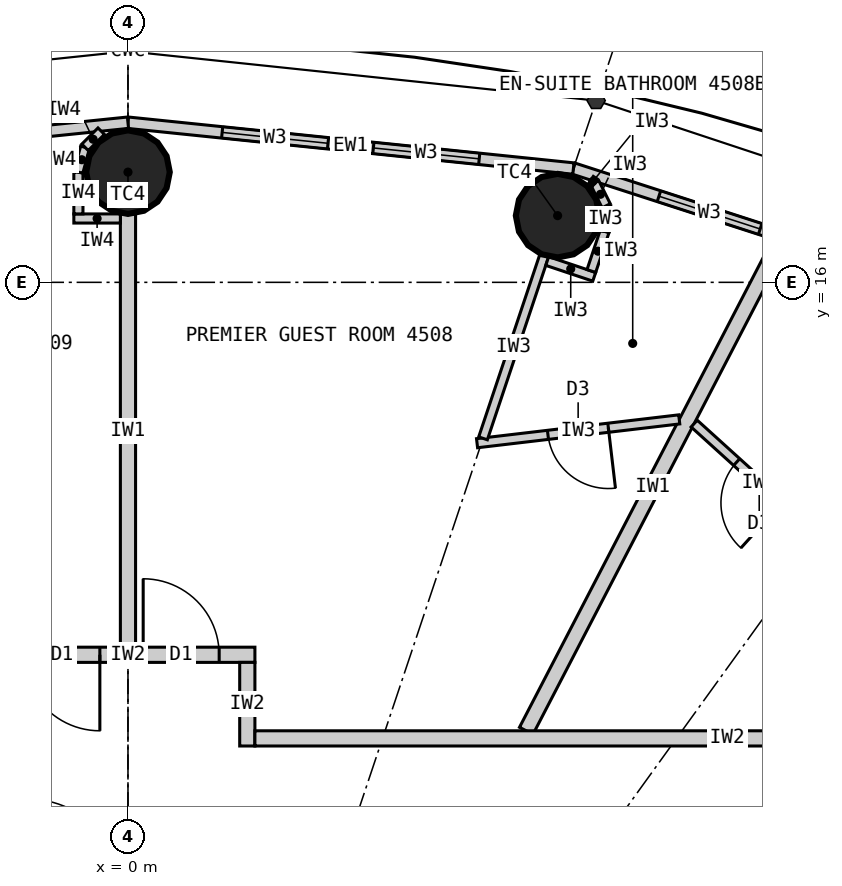
"""IFC4 building model, lengths in metres.
Left out: names, types, materials, properties, quantities, classifications, styles, units other than length and angle.
Written with IfcOpenShell. Run it as: python <this file> out.ifc"""

import sys

from ifc_helpers import new_model, si_unit, direction, frame, frame_2d, origin, origin_2d, place, context, subcontext, project, spatial, rectangle, circle, extrude, element, fill, save


model = new_model("IFC4")
c1 = context("Model", 3, precision=1e-05, world=origin(), true_north=direction((0.0, 1.0)))
c2 = subcontext(c1, "Body", "Model", "MODEL_VIEW")
j1 = project(units=[si_unit("LENGTHUNIT", "METRE"), si_unit("PLANEANGLEUNIT", "RADIAN")], contexts=[c1])
p1 = place(None, origin())
s1 = spatial("IfcSite", under=j1, at=p1, CompositionType="ELEMENT")
p2 = place(p1, origin())
s2 = spatial("IfcBuilding", under=s1, at=p2, CompositionType="ELEMENT")
p3 = place(p2, frame((0.0, 0.0, 169.8)))
s3 = spatial("IfcBuildingStorey", under=s2, at=p3, CompositionType="ELEMENT", Elevation=169.8)
for number, where, z_axis, x_axis in (
    (1, (5.653, 16.877, 0.0), (0.0, 0.0, 1.0), (1.0, 0.0, 0.0)),
    (2, (0.0, 17.45, 0.0), (0.0, 0.0, 1.0), (1.0, 0.0, 0.0)),
):
    element("IfcColumn", number, at=place(p3, frame(where, z_axis=z_axis, x_axis=x_axis)), inside=s3, PredefinedType="COLUMN", context=c2, shape_type="SweptSolid", body=[
        extrude(circle(Radius=0.55, at=origin_2d()), origin(), (0.0, 0.0, 1.0), 3.3),
    ])
p4 = place(p3, frame((11.346, 15.722, 0.0), z_axis=(0.0, 0.0, 1.0), x_axis=(-0.951432482129, 0.307857486429, 0.0)))
e3 = element("IfcWall", 3, at=p4, inside=s3, PredefinedType="ELEMENTEDWALL", context=c2, shape_type="SweptSolid", body=[
    extrude(rectangle(XDim=5.766, YDim=0.15, at=frame_2d((2.883, 0.0))), origin(), (0.0, 0.0, 1.0), 3.12),
])
p5 = place(p4, frame((1.183, 0.0, 0.9)))
e4 = element("IfcOpeningElement", 4, at=p5, cuts=e3, PredefinedType="OPENING", context=c2, shape_type="SweptSolid", body=[
    extrude(rectangle(XDim=1.4, YDim=1.9, at=frame_2d((0.7, 0.95))), frame((0.0, 0.085, 0.0), z_axis=(0.0, -1.0, 0.0), x_axis=(1.0, 0.0, 0.0)), (0.0, 0.0, 1.0), 0.17),
])
p6 = place(p4, frame((3.183, 0.0, 0.9)))
e5 = element("IfcOpeningElement", 5, at=p6, cuts=e3, PredefinedType="OPENING", context=c2, shape_type="SweptSolid", body=[
    extrude(rectangle(XDim=1.4, YDim=1.9, at=frame_2d((0.7, 0.95))), frame((0.0, 0.085, 0.0), z_axis=(0.0, -1.0, 0.0), x_axis=(1.0, 0.0, 0.0)), (0.0, 0.0, 1.0), 0.17),
])
p7 = place(p3, frame((5.86, 17.497, 0.0), z_axis=(0.0, 0.0, 1.0), x_axis=(-0.994751738032, 0.102318032045, 0.0)))
e6 = element("IfcWall", 6, at=p7, inside=s3, PredefinedType="ELEMENTEDWALL", context=c2, shape_type="SweptSolid", body=[
    extrude(rectangle(XDim=5.891, YDim=0.15, at=frame_2d((2.946, 0.0))), origin(), (0.0, 0.0, 1.0), 3.12),
])
p8 = place(p7, frame((1.246, 0.0, 0.9)))
e7 = element("IfcOpeningElement", 7, at=p8, cuts=e6, PredefinedType="OPENING", context=c2, shape_type="SweptSolid", body=[
    extrude(rectangle(XDim=1.4, YDim=1.9, at=frame_2d((0.7, 0.95))), frame((0.0, 0.085, 0.0), z_axis=(0.0, -1.0, 0.0), x_axis=(1.0, 0.0, 0.0)), (0.0, 0.0, 1.0), 0.17),
])
p9 = place(p7, frame((3.246, 0.0, 0.9)))
e8 = element("IfcOpeningElement", 8, at=p9, cuts=e6, PredefinedType="OPENING", context=c2, shape_type="SweptSolid", body=[
    extrude(rectangle(XDim=1.4, YDim=1.9, at=frame_2d((0.7, 0.95))), frame((0.0, 0.085, 0.0), z_axis=(0.0, -1.0, 0.0), x_axis=(1.0, 0.0, 0.0)), (0.0, 0.0, 1.0), 0.17),
])
p10 = place(p3, frame((0.0, 18.1, 0.0), z_axis=(0.0, 0.0, 1.0), x_axis=(-0.994751738032, -0.102318032045, 0.0)))
e9 = element("IfcWall", 9, at=p10, inside=s3, PredefinedType="ELEMENTEDWALL", context=c2, shape_type="SweptSolid", body=[
    extrude(rectangle(XDim=5.891, YDim=0.15, at=frame_2d((2.946, 0.0))), origin(), (0.0, 0.0, 1.0), 3.12),
])
p11 = place(p10, frame((1.246, 0.0, 0.9)))
e10 = element("IfcOpeningElement", 10, at=p11, cuts=e9, PredefinedType="OPENING", context=c2, shape_type="SweptSolid", body=[
    extrude(rectangle(XDim=1.4, YDim=1.9, at=frame_2d((0.7, 0.95))), frame((0.0, 0.085, 0.0), z_axis=(0.0, -1.0, 0.0), x_axis=(1.0, 0.0, 0.0)), (0.0, 0.0, 1.0), 0.17),
])
p12 = place(p10, frame((3.246, 0.0, 0.9)))
e11 = element("IfcOpeningElement", 11, at=p12, cuts=e9, PredefinedType="OPENING", context=c2, shape_type="SweptSolid", body=[
    extrude(rectangle(XDim=1.4, YDim=1.9, at=frame_2d((0.7, 0.95))), frame((0.0, 0.085, 0.0), z_axis=(0.0, -1.0, 0.0), x_axis=(1.0, 0.0, 0.0)), (0.0, 0.0, 1.0), 0.17),
])
p13 = place(p3, frame((5.24, 10.1, 0.0), z_axis=(0.0, 0.0, 1.0), x_axis=(0.460532965373, 0.887642601391, 0.0)))
e12 = element("IfcWall", 12, at=p13, inside=s3, PredefinedType="PARTITIONING", context=c2, shape_type="SweptSolid", body=[
    extrude(rectangle(XDim=7.231, YDim=0.2, at=frame_2d((3.616, 0.0))), origin(), (0.0, 0.0, 1.0), 3.12),
])
p14 = place(p3, frame((0.0, 11.2, 0.0), z_axis=(0.0, 0.0, 1.0), x_axis=(0.0, 1.0, 0.0)))
e13 = element("IfcWall", 13, at=p14, inside=s3, PredefinedType="PARTITIONING", context=c2, shape_type="SweptSolid", body=[
    extrude(rectangle(XDim=5.7, YDim=0.2, at=frame_2d((2.85, 0.0))), origin(), (0.0, 0.0, 1.0), 2.42),
])
p15 = place(p3, frame((-1.67, 11.1, 0.0), z_axis=(0.0, 0.0, 1.0), x_axis=(1.0, 0.0, 0.0)))
e14 = element("IfcWall", 14, at=p15, inside=s3, PredefinedType="PARTITIONING", context=c2, shape_type="SweptSolid", body=[
    extrude(rectangle(XDim=3.34, YDim=0.2, at=frame_2d((1.67, 0.0))), origin(), (0.0, 0.0, 1.0), 3.12),
])
p16 = place(p15, frame((1.87, 0.0, 0.0)))
e15 = element("IfcOpeningElement", 15, at=p16, cuts=e14, PredefinedType="OPENING", context=c2, shape_type="SweptSolid", body=[
    extrude(rectangle(XDim=1.0, YDim=2.2, at=frame_2d((0.5, 1.1))), frame((0.0, 0.11, 0.0), z_axis=(0.0, -1.0, 0.0), x_axis=(1.0, 0.0, 0.0)), (0.0, 0.0, 1.0), 0.22),
])
p17 = place(p15, frame((0.3, 0.0, 0.0)))
e16 = element("IfcOpeningElement", 16, at=p17, cuts=e14, PredefinedType="OPENING", context=c2, shape_type="SweptSolid", body=[
    extrude(rectangle(XDim=1.0, YDim=2.2, at=frame_2d((0.5, 1.1))), frame((0.0, 0.11, 0.0), z_axis=(0.0, -1.0, 0.0), x_axis=(1.0, 0.0, 0.0)), (0.0, 0.0, 1.0), 0.22),
])
p18 = place(p3, frame((1.57, 9.9, 0.0), z_axis=(0.0, 0.0, 1.0), x_axis=(0.0, 1.0, 0.0)))
e17 = element("IfcWall", 17, at=p18, inside=s3, PredefinedType="PARTITIONING", context=c2, shape_type="SweptSolid", body=[
    extrude(rectangle(XDim=1.1, YDim=0.2, at=frame_2d((0.55, 0.0))), origin(), (0.0, 0.0, 1.0), 3.12),
])
p19 = place(p3, frame((7.45, 14.142, 0.0), z_axis=(0.0, 0.0, 1.0), x_axis=(0.74113984586, -0.671350675041, 0.0)))
e18 = element("IfcWall", 18, at=p19, inside=s3, PredefinedType="PARTITIONING", context=c2, shape_type="SweptSolid", body=[
    extrude(rectangle(XDim=2.309, YDim=0.12, at=frame_2d((1.154, 0.0))), origin(), (0.0, 0.0, 1.0), 3.12),
])
p20 = place(p19, frame((0.754, 0.0, 0.0)))
e19 = element("IfcOpeningElement", 19, at=p20, cuts=e18, PredefinedType="OPENING", context=c2, shape_type="SweptSolid", body=[
    extrude(rectangle(XDim=0.8, YDim=2.1, at=frame_2d((0.4, 1.05))), frame((0.0, 0.07, 0.0), z_axis=(0.0, -1.0, 0.0), x_axis=(1.0, 0.0, 0.0)), (0.0, 0.0, 1.0), 0.14),
])
p21 = place(p3, frame((7.253, 14.197, 0.0), z_axis=(0.0, 0.0, 1.0), x_axis=(-0.993128188393, -0.117031625725, 0.0)))
e20 = element("IfcWall", 20, at=p21, inside=s3, PredefinedType="PARTITIONING", context=c2, shape_type="SweptSolid", body=[
    extrude(rectangle(XDim=2.678, YDim=0.12, at=frame_2d((1.339, 0.0))), origin(), (0.0, 0.0, 1.0), 3.12),
])
p22 = place(p21, frame((0.939, 0.0, 0.0)))
e21 = element("IfcOpeningElement", 21, at=p22, cuts=e20, PredefinedType="OPENING", context=c2, shape_type="SweptSolid", body=[
    extrude(rectangle(XDim=0.8, YDim=2.1, at=frame_2d((0.4, 1.05))), frame((0.0, 0.07, 0.0), z_axis=(0.0, -1.0, 0.0), x_axis=(1.0, 0.0, 0.0)), (0.0, 0.0, 1.0), 0.14),
])
p23 = place(p3, frame((4.671, 13.948, 0.0), z_axis=(0.0, 0.0, 1.0), x_axis=(0.317669167093, 0.948201613729, 0.0)))
e22 = element("IfcWall", 22, at=p23, inside=s3, PredefinedType="PARTITIONING", context=c2, shape_type="SweptSolid", body=[
    extrude(rectangle(XDim=2.54, YDim=0.12, at=frame_2d((1.27, 0.0))), origin(), (0.0, 0.0, 1.0), 2.42),
])
p24 = place(p3, frame((5.516, 16.28, 0.0), z_axis=(0.0, 0.0, 1.0), x_axis=(0.948157944392, -0.317799484717, 0.0)))
e23 = element("IfcWall", 23, at=p24, inside=s3, PredefinedType="PARTITIONING", context=c2, shape_type="SweptSolid", body=[
    extrude(rectangle(XDim=0.652, YDim=0.12, at=frame_2d((0.326, 0.0))), origin(), (0.0, 0.0, 1.0), 3.12),
])
p25 = place(p3, frame((6.097, 16.149, 0.0), z_axis=(0.0, 0.0, 1.0), x_axis=(0.317292604854, 0.948327687514, 0.0)))
e24 = element("IfcWall", 24, at=p25, inside=s3, PredefinedType="PARTITIONING", context=c2, shape_type="SweptSolid", body=[
    extrude(rectangle(XDim=0.55, YDim=0.12, at=frame_2d((0.275, 0.0))), origin(), (0.0, 0.0, 1.0), 3.12),
])
for number, where, z_axis, x_axis in (
    (25, (6.271, 16.67, 0.0), (0.0, 0.0, 1.0), (0.061, 0.998, 0.0)),
    (26, (6.292, 17.007, 0.0), (0.0, 0.0, 1.0), (-0.445, 0.895, 0.0)),
):
    element("IfcWall", number, at=place(p3, frame(where, z_axis=z_axis, x_axis=x_axis)), inside=s3, PredefinedType="PARTITIONING", context=c2, shape_type="SweptSolid", body=[
        extrude(rectangle(XDim=0.338, YDim=0.12, at=frame_2d((0.169, 0.0))), origin(), (0.0, 0.0, 1.0), 3.12),
    ])
p26 = place(p3, frame((6.142, 17.31, 0.0), z_axis=(0.0, 0.0, 1.0), x_axis=(-0.835039693181, 0.550189704386, 0.0)))
e27 = element("IfcWall", 27, at=p26, inside=s3, PredefinedType="PARTITIONING", context=c2, shape_type="SweptSolid", body=[
    extrude(rectangle(XDim=0.062, YDim=0.12, at=frame_2d((0.031, 0.0))), origin(), (0.0, 0.0, 1.0), 3.12),
])
p27 = place(p3, frame((1.67, 10.0, 0.0), z_axis=(0.0, 0.0, 1.0), x_axis=(1.0, 0.0, 0.0)))
e28 = element("IfcWall", 28, at=p27, inside=s3, PredefinedType="PARTITIONING", context=c2, shape_type="SweptSolid", body=[
    extrude(rectangle(XDim=12.43, YDim=0.2, at=frame_2d((6.215, 0.0))), origin(), (0.0, 0.0, 1.0), 3.12),
])
p28 = place(p27, frame((9.655, 0.0, 0.0)))
e29 = element("IfcOpeningElement", 29, at=p28, cuts=e28, PredefinedType="OPENING", context=c2, shape_type="SweptSolid", body=[
    extrude(rectangle(XDim=1.0, YDim=2.2, at=frame_2d((0.5, 1.1))), frame((0.0, 0.11, 0.0), z_axis=(0.0, -1.0, 0.0), x_axis=(1.0, 0.0, 0.0)), (0.0, 0.0, 1.0), 0.22),
])
p29 = place(p3, frame((-0.1, 16.84, 0.0), z_axis=(0.0, 0.0, 1.0), x_axis=(-1.0, 0.0, 0.0)))
e30 = element("IfcWall", 30, at=p29, inside=s3, PredefinedType="PARTITIONING", context=c2, shape_type="SweptSolid", body=[
    extrude(rectangle(XDim=0.612, YDim=0.12, at=frame_2d((0.306, 0.0))), origin(), (0.0, 0.0, 1.0), 3.12),
])
p30 = place(p3, frame((-0.652, 16.9, 0.0), z_axis=(0.0, 0.0, 1.0), x_axis=(0.0, 1.0, 0.0)))
e31 = element("IfcWall", 31, at=p30, inside=s3, PredefinedType="PARTITIONING", context=c2, shape_type="SweptSolid", body=[
    extrude(rectangle(XDim=0.55, YDim=0.12, at=frame_2d((0.275, 0.0))), origin(), (0.0, 0.0, 1.0), 3.12),
])
p31 = place(p3, frame((-0.652, 17.45, 0.0), z_axis=(0.0, 0.0, 1.0), x_axis=(0.258832454679, 0.965922233104, 0.0)))
e32 = element("IfcWall", 32, at=p31, inside=s3, PredefinedType="PARTITIONING", context=c2, shape_type="SweptSolid", body=[
    extrude(rectangle(XDim=0.338, YDim=0.12, at=frame_2d((0.169, 0.0))), origin(), (0.0, 0.0, 1.0), 3.12),
])
p32 = place(p3, frame((-0.565, 17.776, 0.0), z_axis=(0.0, 0.0, 1.0), x_axis=(0.707106781187, 0.707106781187, 0.0)))
e33 = element("IfcWall", 33, at=p32, inside=s3, PredefinedType="PARTITIONING", context=c2, shape_type="SweptSolid", body=[
    extrude(rectangle(XDim=0.301, YDim=0.12, at=frame_2d((0.15, 0.0))), origin(), (0.0, 0.0, 1.0), 3.12),
])
p33 = place(p6, origin())
e34 = element("IfcWindow", 34, at=p33, inside=s3, PartitioningType="SINGLE_PANEL", PredefinedType="WINDOW", context=c2, shape_type="SweptSolid", body=[
    extrude(rectangle(XDim=1.4, YDim=1.9, at=frame_2d((0.7, 0.95))), frame((0.0, 0.03, 0.0), z_axis=(0.0, -1.0, 0.0), x_axis=(1.0, 0.0, 0.0)), (0.0, 0.0, 1.0), 0.06),
])
fill(e5, e34)
p34 = place(p8, origin())
e35 = element("IfcWindow", 35, at=p34, inside=s3, PartitioningType="SINGLE_PANEL", PredefinedType="WINDOW", context=c2, shape_type="SweptSolid", body=[
    extrude(rectangle(XDim=1.4, YDim=1.9, at=frame_2d((0.7, 0.95))), frame((0.0, 0.03, 0.0), z_axis=(0.0, -1.0, 0.0), x_axis=(1.0, 0.0, 0.0)), (0.0, 0.0, 1.0), 0.06),
])
fill(e7, e35)
p35 = place(p9, origin())
e36 = element("IfcWindow", 36, at=p35, inside=s3, PartitioningType="SINGLE_PANEL", PredefinedType="WINDOW", context=c2, shape_type="SweptSolid", body=[
    extrude(rectangle(XDim=1.4, YDim=1.9, at=frame_2d((0.7, 0.95))), frame((0.0, 0.03, 0.0), z_axis=(0.0, -1.0, 0.0), x_axis=(1.0, 0.0, 0.0)), (0.0, 0.0, 1.0), 0.06),
])
fill(e8, e36)
p36 = place(p20, origin())
e37 = element("IfcDoor", 37, at=p36, inside=s3, OperationType="SINGLE_SWING_RIGHT", PredefinedType="DOOR", context=c2, shape_type="SweptSolid", body=[
    extrude(rectangle(XDim=0.8, YDim=2.1, at=frame_2d((0.4, 1.05))), frame((0.0, 0.025, 0.0), z_axis=(0.0, -1.0, 0.0), x_axis=(1.0, 0.0, 0.0)), (0.0, 0.0, 1.0), 0.05),
])
fill(e19, e37)
p37 = place(p22, origin())
e38 = element("IfcDoor", 38, at=p37, inside=s3, OperationType="SINGLE_SWING_LEFT", PredefinedType="DOOR", context=c2, shape_type="SweptSolid", body=[
    extrude(rectangle(XDim=0.8, YDim=2.1, at=frame_2d((0.4, 1.05))), frame((0.0, 0.025, 0.0), z_axis=(0.0, -1.0, 0.0), x_axis=(1.0, 0.0, 0.0)), (0.0, 0.0, 1.0), 0.05),
])
fill(e21, e38)
p38 = place(p16, origin())
e39 = element("IfcDoor", 39, at=p38, inside=s3, OperationType="SINGLE_SWING_LEFT", PredefinedType="DOOR", context=c2, shape_type="SweptSolid", body=[
    extrude(rectangle(XDim=1.0, YDim=2.2, at=frame_2d((0.5, 1.1))), frame((0.0, 0.025, 0.0), z_axis=(0.0, -1.0, 0.0), x_axis=(1.0, 0.0, 0.0)), (0.0, 0.0, 1.0), 0.05),
])
fill(e15, e39)
p39 = place(p17, origin())
e40 = element("IfcDoor", 40, at=p39, inside=s3, OperationType="SINGLE_SWING_RIGHT", PredefinedType="DOOR", context=c2, shape_type="SweptSolid", body=[
    extrude(rectangle(XDim=1.0, YDim=2.2, at=frame_2d((0.5, 1.1))), frame((0.0, 0.025, 0.0), z_axis=(0.0, -1.0, 0.0), x_axis=(1.0, 0.0, 0.0)), (0.0, 0.0, 1.0), 0.05),
])
fill(e16, e40)
save(model, sys.argv[1])
